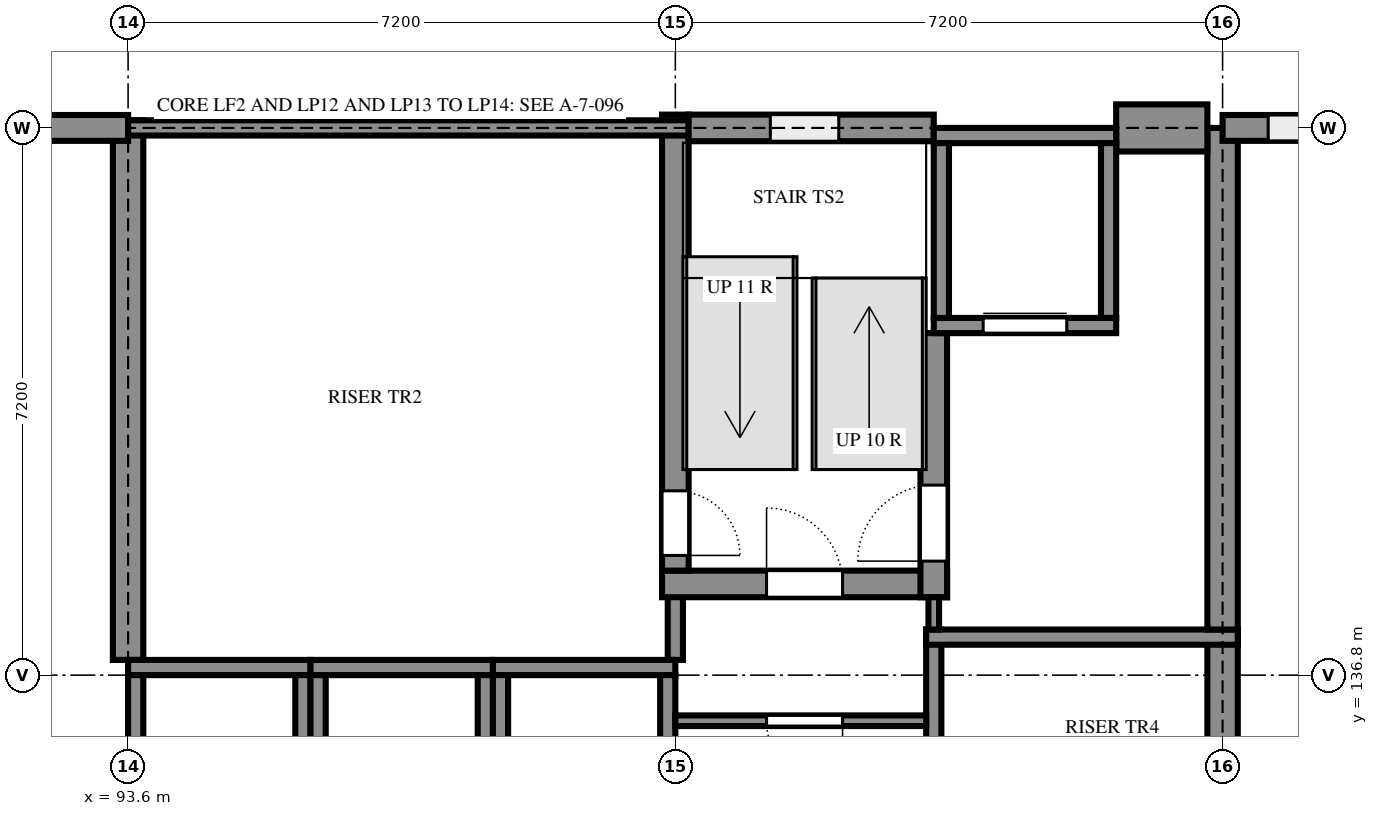
"""IFC4 building model, lengths in metres.
Left out: names, types, materials, properties, quantities, classifications, styles, units other than length and angle.
Written with IfcOpenShell. Run it as: python <this file> out.ifc"""

import sys

from ifc_helpers import new_model, si_unit, direction, frame, frame_2d, origin, place, context, subcontext, project, spatial, rectangle, extrude, element, fill, save


model = new_model("IFC4")
c1 = context("Model", 3, precision=1e-05, world=origin(), true_north=direction((0.0, 1.0)))
c2 = subcontext(c1, "Body", "Model", "MODEL_VIEW")
j1 = project(units=[si_unit("LENGTHUNIT", "METRE"), si_unit("PLANEANGLEUNIT", "RADIAN")], contexts=[c1])
p1 = place(None, origin())
s1 = spatial("IfcSite", under=j1, at=p1, CompositionType="ELEMENT")
p2 = place(p1, origin())
s2 = spatial("IfcBuilding", under=s1, at=p2, CompositionType="ELEMENT")
p3 = place(p2, frame((0.0, 0.0, 18.0)))
s3 = spatial("IfcBuildingStorey", under=s2, at=p3, CompositionType="ELEMENT", Elevation=18.0)
p4 = place(p3, frame((108.0, 134.5, 0.0), z_axis=(0.0, 0.0, 1.0), x_axis=(0.0, 1.0, 0.0)))
e1 = element("IfcWall", 1, at=p4, inside=s3, PredefinedType="SHEAR", context=c2, shape_type="SweptSolid", body=[
    extrude(rectangle(XDim=2.9, YDim=0.4, at=frame_2d((1.45, 0.0))), origin(), (0.0, 0.0, 1.0), 3.6),
])
p5 = place(p3, frame((100.8, 137.0, 0.0), z_axis=(0.0, 0.0, 1.0), x_axis=(0.0, 1.0, 0.0)))
e2 = element("IfcWall", 2, at=p5, inside=s3, PredefinedType="SHEAR", context=c2, shape_type="SweptSolid", body=[
    extrude(rectangle(XDim=1.175, YDim=0.2, at=frame_2d((0.587, 0.0))), origin(), (0.0, 0.0, 1.0), 3.6),
])
p6 = place(p3, frame((104.2, 137.4, 0.0), z_axis=(0.0, 0.0, 1.0), x_axis=(0.0, -1.0, 0.0)))
e3 = element("IfcWall", 3, at=p6, inside=s3, PredefinedType="SHEAR", context=c2, shape_type="SweptSolid", body=[
    extrude(rectangle(XDim=3.1, YDim=0.2, at=frame_2d((1.55, 0.0))), origin(), (0.0, 0.0, 1.0), 3.6),
])
p7 = place(p3, frame((108.2, 137.3, 0.0), z_axis=(0.0, 0.0, 1.0), x_axis=(-1.0, 0.0, 0.0)))
e4 = element("IfcWall", 4, at=p7, inside=s3, PredefinedType="SHEAR", context=c2, shape_type="SweptSolid", body=[
    extrude(rectangle(XDim=4.1, YDim=0.2, at=frame_2d((2.05, 0.0))), origin(), (0.0, 0.0, 1.0), 3.6),
])
p8 = place(p3, frame((108.0, 137.4, 0.0), z_axis=(0.0, 0.0, 1.0), x_axis=(0.0, 1.0, 0.0)))
e5 = element("IfcWall", 5, at=p8, inside=s3, PredefinedType="SHEAR", context=c2, shape_type="SweptSolid", body=[
    extrude(rectangle(XDim=6.6, YDim=0.4, at=frame_2d((3.3, 0.0))), origin(), (0.0, 0.0, 1.0), 3.6),
])
p9 = place(p3, frame((100.625, 138.0, 0.0), z_axis=(0.0, 0.0, 1.0), x_axis=(1.0, 0.0, 0.0)))
e6 = element("IfcWall", 6, at=p9, inside=s3, PredefinedType="SHEAR", context=c2, shape_type="SweptSolid", body=[
    extrude(rectangle(XDim=3.75, YDim=0.35, at=frame_2d((1.875, 0.0))), origin(), (0.0, 0.0, 1.0), 3.6),
])
p10 = place(p9, frame((1.375, 0.0, 0.0)))
e7 = element("IfcOpeningElement", 7, at=p10, cuts=e6, PredefinedType="OPENING", context=c2, shape_type="SweptSolid", body=[
    extrude(rectangle(XDim=1.0, YDim=2.1, at=frame_2d((0.5, 1.05))), frame((0.0, 0.185, 0.0), z_axis=(0.0, -1.0, 0.0), x_axis=(1.0, 0.0, 0.0)), (0.0, 0.0, 1.0), 0.37),
])
p11 = place(p3, frame((104.2, 137.825, 0.0), z_axis=(0.0, 0.0, 1.0), x_axis=(0.0, 1.0, 0.0)))
e8 = element("IfcWall", 8, at=p11, inside=s3, PredefinedType="SHEAR", context=c2, shape_type="SweptSolid", body=[
    extrude(rectangle(XDim=3.475, YDim=0.35, at=frame_2d((1.738, 0.0))), origin(), (0.0, 0.0, 1.0), 3.6),
])
p12 = place(p11, frame((0.475, 0.0, 0.0)))
e9 = element("IfcOpeningElement", 9, at=p12, cuts=e8, PredefinedType="OPENING", context=c2, shape_type="SweptSolid", body=[
    extrude(rectangle(XDim=1.0, YDim=2.1, at=frame_2d((0.5, 1.05))), frame((0.0, 0.185, 0.0), z_axis=(0.0, -1.0, 0.0), x_axis=(1.0, 0.0, 0.0)), (0.0, 0.0, 1.0), 0.37),
])
p13 = place(p3, frame((93.6, 144.1, 0.0), z_axis=(0.0, 0.0, 1.0), x_axis=(0.0, -1.0, 0.0)))
e10 = element("IfcWall", 10, at=p13, inside=s3, PredefinedType="SHEAR", context=c2, shape_type="SweptSolid", body=[
    extrude(rectangle(XDim=7.1, YDim=0.4, at=frame_2d((3.55, 0.0))), origin(), (0.0, 0.0, 1.0), 3.6),
])
p14 = place(p3, frame((100.8, 144.175, 0.0), z_axis=(0.0, 0.0, 1.0), x_axis=(0.0, -1.0, 0.0)))
e11 = element("IfcWall", 11, at=p14, inside=s3, PredefinedType="SHEAR", context=c2, shape_type="SweptSolid", body=[
    extrude(rectangle(XDim=6.0, YDim=0.35, at=frame_2d((3.0, 0.0))), origin(), (0.0, 0.0, 1.0), 3.6),
])
p15 = place(p14, frame((4.95, 0.0, 0.0)))
e12 = element("IfcOpeningElement", 12, at=p15, cuts=e11, PredefinedType="OPENING", context=c2, shape_type="SweptSolid", body=[
    extrude(rectangle(XDim=0.85, YDim=2.1, at=frame_2d((0.425, 1.05))), frame((0.0, 0.185, 0.0), z_axis=(0.0, -1.0, 0.0), x_axis=(1.0, 0.0, 0.0)), (0.0, 0.0, 1.0), 0.37),
])
p16 = place(p3, frame((100.975, 144.0, 0.0), z_axis=(0.0, 0.0, 1.0), x_axis=(-1.0, 0.0, 0.0)))
e13 = element("IfcWall", 13, at=p16, inside=s3, PredefinedType="SHEAR", context=c2, shape_type="SweptSolid", body=[
    extrude(rectangle(XDim=7.575, YDim=0.2, at=frame_2d((3.788, 0.0))), origin(), (0.0, 0.0, 1.0), 3.6),
])
p17 = place(p3, frame((104.2, 144.0, 0.0), z_axis=(0.0, 0.0, 1.0), x_axis=(-1.0, 0.0, 0.0)))
e14 = element("IfcWall", 14, at=p17, inside=s3, PredefinedType="SHEAR", context=c2, shape_type="SweptSolid", body=[
    extrude(rectangle(XDim=3.225, YDim=0.35, at=frame_2d((1.612, 0.0))), origin(), (0.0, 0.0, 1.0), 3.6),
])
p18 = place(p17, frame((1.25, 0.0, 0.6)))
e15 = element("IfcOpeningElement", 15, at=p18, cuts=e14, PredefinedType="OPENING", context=c2, shape_type="SweptSolid", body=[
    extrude(rectangle(XDim=0.9, YDim=2.1, at=frame_2d((0.45, 1.05))), frame((0.0, 0.185, 0.0), z_axis=(0.0, -1.0, 0.0), x_axis=(1.0, 0.0, 0.0)), (0.0, 0.0, 1.0), 0.37),
])
p19 = place(p3, frame((115.046, 144.0, 0.0), z_axis=(0.0, 0.0, 1.0), x_axis=(-1.0, 0.0, 0.0)))
e16 = element("IfcWall", 16, at=p19, inside=s3, PredefinedType="SOLIDWALL", context=c2, shape_type="SweptSolid", body=[
    extrude(rectangle(XDim=7.046, YDim=0.34, at=frame_2d((3.523, 0.0))), origin(), (0.0, 0.0, 1.0), 3.16),
])
p20 = place(p19, frame((4.046, 0.0, 0.9)))
e17 = element("IfcOpeningElement", 17, at=p20, cuts=e16, PredefinedType="OPENING", context=c2, shape_type="SweptSolid", body=[
    extrude(rectangle(XDim=2.4, YDim=1.8, at=frame_2d((1.2, 0.9))), frame((0.0, 0.18, 0.0), z_axis=(0.0, -1.0, 0.0), x_axis=(1.0, 0.0, 0.0)), (0.0, 0.0, 1.0), 0.36),
])
p21 = place(p19, frame((0.447, 0.0, 0.9)))
e18 = element("IfcOpeningElement", 18, at=p21, cuts=e16, PredefinedType="OPENING", context=c2, shape_type="SweptSolid", body=[
    extrude(rectangle(XDim=2.4, YDim=1.8, at=frame_2d((1.2, 0.9))), frame((0.0, 0.18, 0.0), z_axis=(0.0, -1.0, 0.0), x_axis=(1.0, 0.0, 0.0)), (0.0, 0.0, 1.0), 0.36),
])
p22 = place(p3, frame((107.8, 144.0, 0.0), z_axis=(0.0, 0.0, 1.0), x_axis=(-1.0, 0.0, 0.0)))
e19 = element("IfcWall", 19, at=p22, inside=s3, PredefinedType="SOLIDWALL", context=c2, shape_type="SweptSolid", body=[
    extrude(rectangle(XDim=1.2, YDim=0.62, at=frame_2d((0.6, 0.0))), origin(), (0.0, 0.0, 1.0), 3.46),
])
p23 = place(p3, frame((93.6, 144.0, 0.0), z_axis=(0.0, 0.0, 1.0), x_axis=(-1.0, 0.0, 0.0)))
e20 = element("IfcWall", 20, at=p23, inside=s3, PredefinedType="SOLIDWALL", context=c2, shape_type="SweptSolid", body=[
    extrude(rectangle(XDim=7.047, YDim=0.34, at=frame_2d((3.523, 0.0))), origin(), (0.0, 0.0, 1.0), 3.16),
])
p24 = place(p3, frame((93.6, 136.9, 0.0), z_axis=(0.0, 0.0, 1.0), x_axis=(1.0, 0.0, 0.0)))
e21 = element("IfcWall", 21, at=p24, inside=s3, PredefinedType="SHEAR", context=c2, shape_type="SweptSolid", body=[
    extrude(rectangle(XDim=2.4, YDim=0.2, at=frame_2d((1.2, 0.0))), origin(), (0.0, 0.0, 1.0), 3.6),
])
for number, where, z_axis, x_axis in (
    (22, (93.7, 134.6, 0.0), (0.0, 0.0, 1.0), (0.0, 1.0, 0.0)),
    (23, (95.9, 134.6, 0.0), (0.0, 0.0, 1.0), (0.0, 1.0, 0.0)),
):
    element("IfcWall", number, at=place(p3, frame(where, z_axis=z_axis, x_axis=x_axis)), inside=s3, PredefinedType="SHEAR", context=c2, shape_type="SweptSolid", body=[
        extrude(rectangle(XDim=2.2, YDim=0.2, at=frame_2d((1.1, 0.0))), origin(), (0.0, 0.0, 1.0), 3.6),
    ])
p25 = place(p3, frame((96.0, 136.9, 0.0), z_axis=(0.0, 0.0, 1.0), x_axis=(1.0, 0.0, 0.0)))
e24 = element("IfcWall", 24, at=p25, inside=s3, PredefinedType="SHEAR", context=c2, shape_type="SweptSolid", body=[
    extrude(rectangle(XDim=2.4, YDim=0.2, at=frame_2d((1.2, 0.0))), origin(), (0.0, 0.0, 1.0), 3.6),
])
for number, where, z_axis, x_axis in (
    (25, (96.1, 134.6, 0.0), (0.0, 0.0, 1.0), (0.0, 1.0, 0.0)),
    (26, (98.3, 134.6, 0.0), (0.0, 0.0, 1.0), (0.0, 1.0, 0.0)),
):
    element("IfcWall", number, at=place(p3, frame(where, z_axis=z_axis, x_axis=x_axis)), inside=s3, PredefinedType="SHEAR", context=c2, shape_type="SweptSolid", body=[
        extrude(rectangle(XDim=2.2, YDim=0.2, at=frame_2d((1.1, 0.0))), origin(), (0.0, 0.0, 1.0), 3.6),
    ])
p26 = place(p3, frame((98.4, 136.9, 0.0), z_axis=(0.0, 0.0, 1.0), x_axis=(1.0, 0.0, 0.0)))
e27 = element("IfcWall", 27, at=p26, inside=s3, PredefinedType="SHEAR", context=c2, shape_type="SweptSolid", body=[
    extrude(rectangle(XDim=2.4, YDim=0.2, at=frame_2d((1.2, 0.0))), origin(), (0.0, 0.0, 1.0), 3.6),
])
for number, where, z_axis, x_axis in (
    (28, (98.5, 134.6, 0.0), (0.0, 0.0, 1.0), (0.0, 1.0, 0.0)),
    (29, (100.7, 134.6, 0.0), (0.0, 0.0, 1.0), (0.0, 1.0, 0.0)),
):
    element("IfcWall", number, at=place(p3, frame(where, z_axis=z_axis, x_axis=x_axis)), inside=s3, PredefinedType="SHEAR", context=c2, shape_type="SweptSolid", body=[
        extrude(rectangle(XDim=2.2, YDim=0.2, at=frame_2d((1.1, 0.0))), origin(), (0.0, 0.0, 1.0), 3.6),
    ])
p27 = place(p3, frame((104.2, 141.4, 0.0), z_axis=(0.0, 0.0, 1.0), x_axis=(1.0, 0.0, 0.0)))
e30 = element("IfcWall", 30, at=p27, inside=s3, PredefinedType="SHEAR", context=c2, shape_type="SweptSolid", body=[
    extrude(rectangle(XDim=2.4, YDim=0.2, at=frame_2d((1.2, 0.0))), origin(), (0.0, 0.0, 1.0), 3.6),
])
p28 = place(p27, frame((0.65, 0.0, 0.0)))
e31 = element("IfcOpeningElement", 31, at=p28, cuts=e30, PredefinedType="OPENING", context=c2, shape_type="SweptSolid", body=[
    extrude(rectangle(XDim=1.1, YDim=2.1, at=frame_2d((0.55, 1.05))), frame((0.0, 0.11, 0.0), z_axis=(0.0, -1.0, 0.0), x_axis=(1.0, 0.0, 0.0)), (0.0, 0.0, 1.0), 0.22),
])
p29 = place(p3, frame((104.2, 143.9, 0.0), z_axis=(0.0, 0.0, 1.0), x_axis=(1.0, 0.0, 0.0)))
e32 = element("IfcWall", 32, at=p29, inside=s3, PredefinedType="SHEAR", context=c2, shape_type="SweptSolid", body=[
    extrude(rectangle(XDim=2.4, YDim=0.2, at=frame_2d((1.2, 0.0))), origin(), (0.0, 0.0, 1.0), 3.6),
])
for number, where, z_axis, x_axis in (
    (33, (104.3, 141.5, 0.0), (0.0, 0.0, 1.0), (0.0, 1.0, 0.0)),
    (34, (106.5, 141.5, 0.0), (0.0, 0.0, 1.0), (0.0, 1.0, 0.0)),
):
    element("IfcWall", number, at=place(p3, frame(where, z_axis=z_axis, x_axis=x_axis)), inside=s3, PredefinedType="SHEAR", context=c2, shape_type="SweptSolid", body=[
        extrude(rectangle(XDim=2.3, YDim=0.2, at=frame_2d((1.15, 0.0))), origin(), (0.0, 0.0, 1.0), 3.6),
    ])
p30 = place(p3, frame((100.8, 136.2, 0.0), z_axis=(0.0, 0.0, 1.0), x_axis=(1.0, 0.0, 0.0)))
e35 = element("IfcWall", 35, at=p30, inside=s3, PredefinedType="PARTITIONING", context=c2, shape_type="SweptSolid", body=[
    extrude(rectangle(XDim=3.3, YDim=0.14, at=frame_2d((1.65, 0.0))), origin(), (0.0, 0.0, 1.0), 3.46),
])
p31 = place(p30, frame((1.2, 0.0, 0.0)))
e36 = element("IfcOpeningElement", 36, at=p31, cuts=e35, PredefinedType="OPENING", context=c2, shape_type="SweptSolid", body=[
    extrude(rectangle(XDim=1.0, YDim=2.1, at=frame_2d((0.5, 1.05))), frame((0.0, 0.08, 0.0), z_axis=(0.0, -1.0, 0.0), x_axis=(1.0, 0.0, 0.0)), (0.0, 0.0, 1.0), 0.16),
])
p32 = place(p3, frame((104.2, 137.4, 0.0), z_axis=(0.0, 0.0, 1.0), x_axis=(0.0, 1.0, 0.0)))
e37 = element("IfcWall", 37, at=p32, inside=s3, PredefinedType="PARTITIONING", context=c2, shape_type="SweptSolid", body=[
    extrude(rectangle(XDim=0.425, YDim=0.14, at=frame_2d((0.212, 0.0))), origin(), (0.0, 0.0, 1.0), 3.46),
])
p33 = place(p20, origin())
e38 = element("IfcWindow", 38, at=p33, inside=s3, PartitioningType="SINGLE_PANEL", PredefinedType="WINDOW", context=c2, shape_type="SweptSolid", body=[
    extrude(rectangle(XDim=2.4, YDim=1.8, at=frame_2d((1.2, 0.9))), frame((0.0, 0.03, 0.0), z_axis=(0.0, -1.0, 0.0), x_axis=(1.0, 0.0, 0.0)), (0.0, 0.0, 1.0), 0.06),
])
fill(e17, e38)
p34 = place(p18, origin())
e39 = element("IfcWindow", 39, at=p34, inside=s3, PartitioningType="SINGLE_PANEL", PredefinedType="WINDOW", context=c2, shape_type="SweptSolid", body=[
    extrude(rectangle(XDim=0.9, YDim=2.1, at=frame_2d((0.45, 1.05))), frame((0.0, 0.03, 0.0), z_axis=(0.0, -1.0, 0.0), x_axis=(1.0, 0.0, 0.0)), (0.0, 0.0, 1.0), 0.06),
])
fill(e15, e39)
p35 = place(p28, origin())
e40 = element("IfcDoor", 40, at=p35, inside=s3, OperationType="SLIDING_TO_LEFT", PredefinedType="DOOR", context=c2, shape_type="SweptSolid", body=[
    extrude(rectangle(XDim=1.1, YDim=2.1, at=frame_2d((0.55, 1.05))), frame((0.0, 0.025, 0.0), z_axis=(0.0, -1.0, 0.0), x_axis=(1.0, 0.0, 0.0)), (0.0, 0.0, 1.0), 0.05),
])
fill(e31, e40)
p36 = place(p31, frame((1.0, 0.0, 0.0), z_axis=(0.0, 0.0, 1.0), x_axis=(-1.0, 0.0, 0.0)))
e41 = element("IfcDoor", 41, at=p36, inside=s3, OperationType="SINGLE_SWING_RIGHT", PredefinedType="DOOR", context=c2, shape_type="SweptSolid", body=[
    extrude(rectangle(XDim=1.0, YDim=2.1, at=frame_2d((0.5, 1.05))), frame((0.0, 0.025, 0.0), z_axis=(0.0, -1.0, 0.0), x_axis=(1.0, 0.0, 0.0)), (0.0, 0.0, 1.0), 0.05),
])
fill(e36, e41)
p37 = place(p10, origin())
e42 = element("IfcDoor", 42, at=p37, inside=s3, OperationType="SINGLE_SWING_RIGHT", PredefinedType="DOOR", context=c2, shape_type="SweptSolid", body=[
    extrude(rectangle(XDim=1.0, YDim=2.1, at=frame_2d((0.5, 1.05))), frame((0.0, 0.025, 0.0), z_axis=(0.0, -1.0, 0.0), x_axis=(1.0, 0.0, 0.0)), (0.0, 0.0, 1.0), 0.05),
])
fill(e7, e42)
p38 = place(p15, origin())
e43 = element("IfcDoor", 43, at=p38, inside=s3, OperationType="SINGLE_SWING_LEFT", PredefinedType="DOOR", context=c2, shape_type="SweptSolid", body=[
    extrude(rectangle(XDim=0.85, YDim=2.1, at=frame_2d((0.425, 1.05))), frame((0.0, 0.025, 0.0), z_axis=(0.0, -1.0, 0.0), x_axis=(1.0, 0.0, 0.0)), (0.0, 0.0, 1.0), 0.05),
])
fill(e12, e43)
p39 = place(p12, origin())
e44 = element("IfcDoor", 44, at=p39, inside=s3, OperationType="SINGLE_SWING_RIGHT", PredefinedType="DOOR", context=c2, shape_type="SweptSolid", body=[
    extrude(rectangle(XDim=1.0, YDim=2.1, at=frame_2d((0.5, 1.05))), frame((0.0, 0.025, 0.0), z_axis=(0.0, -1.0, 0.0), x_axis=(1.0, 0.0, 0.0)), (0.0, 0.0, 1.0), 0.05),
])
fill(e9, e44)
save(model, sys.argv[1])
